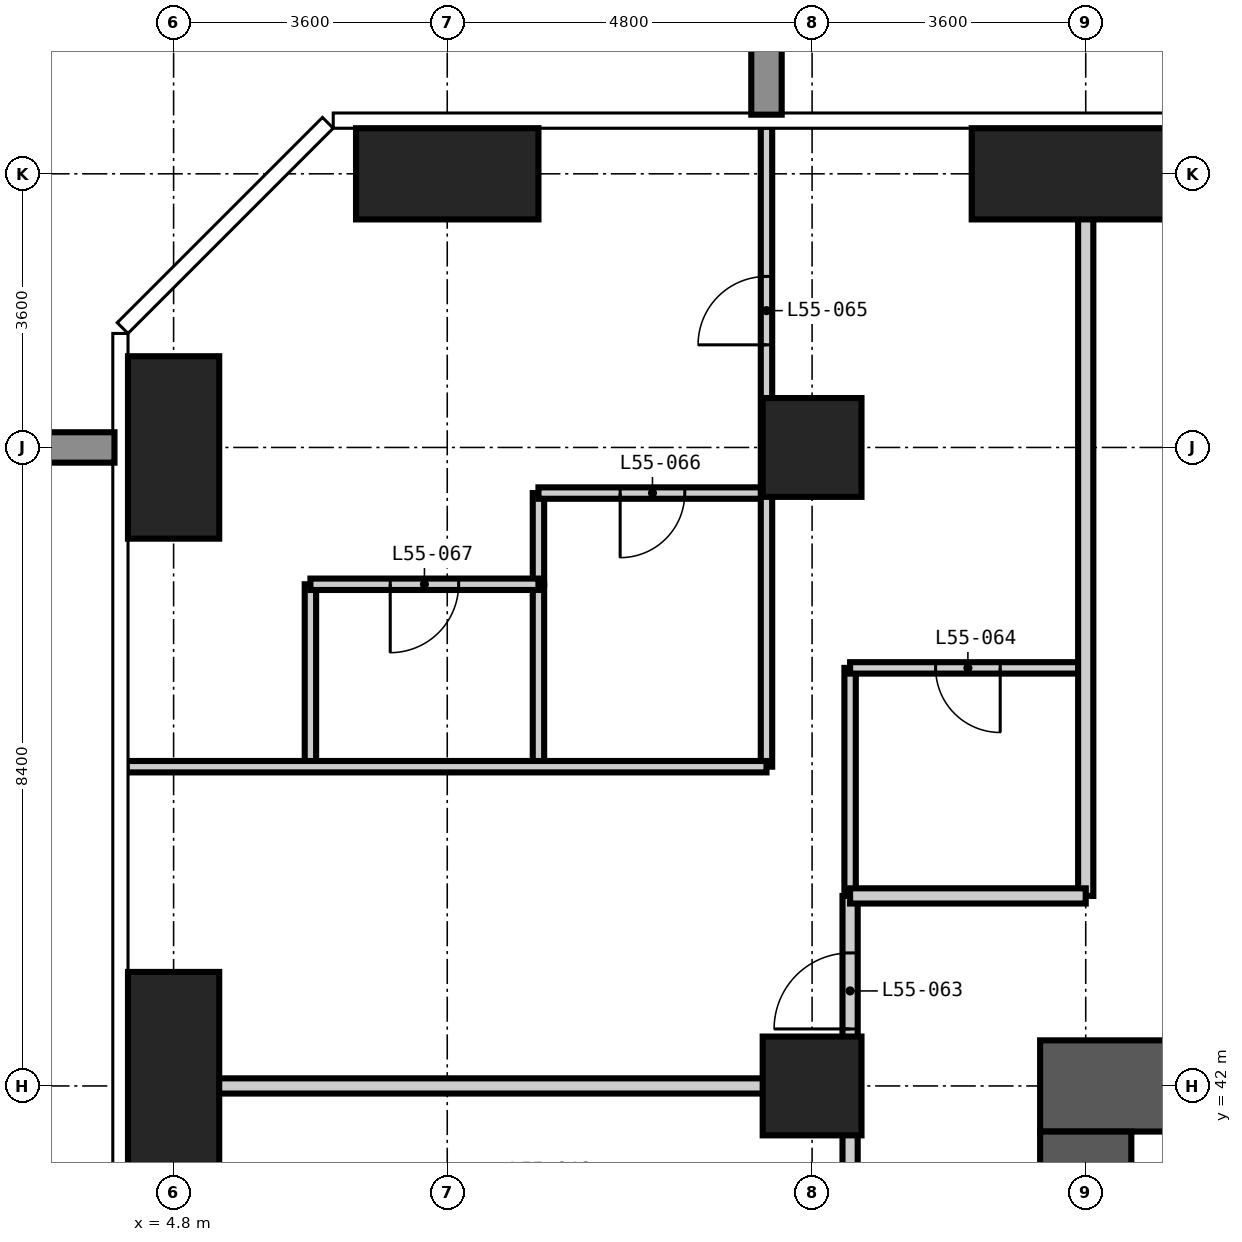
"""IFC4 building model, lengths in metres.
Left out: names, types, materials, properties, quantities, classifications, styles, units other than length and angle.
Written with IfcOpenShell. Run it as: python <this file> out.ifc"""

import sys

from ifc_helpers import new_model, si_unit, direction, frame, frame_2d, origin, origin_2d, place, context, subcontext, project, spatial, rectangle, extrude, element, fill, save


model = new_model("IFC4")
c1 = context("Model", 3, precision=1e-05, world=origin(), true_north=direction((0.0, 1.0)))
c2 = subcontext(c1, "Body", "Model", "MODEL_VIEW")
j1 = project(units=[si_unit("LENGTHUNIT", "METRE"), si_unit("PLANEANGLEUNIT", "RADIAN")], contexts=[c1])
p1 = place(None, origin())
s1 = spatial("IfcSite", under=j1, at=p1, CompositionType="ELEMENT")
p2 = place(p1, origin())
s2 = spatial("IfcBuilding", under=s1, at=p2, CompositionType="ELEMENT")
p3 = place(p2, frame((0.0, 0.0, 213.0)))
s3 = spatial("IfcBuildingStorey", under=s2, at=p3, CompositionType="ELEMENT", Elevation=213.0)
p4 = place(p3, frame((4.8, 42.0, -0.35), z_axis=(0.0, 0.0, 1.0), x_axis=(1.0, 0.0, 0.0)))
e1 = element("IfcColumn", 1, at=p4, inside=s3, PredefinedType="COLUMN", context=c2, shape_type="SweptSolid", body=[
    extrude(rectangle(XDim=1.2, YDim=3.0, at=origin_2d()), origin(), (0.0, 0.0, 1.0), 3.6),
])
p5 = place(p3, frame((4.8, 50.4, -0.35), z_axis=(0.0, 0.0, 1.0), x_axis=(1.0, 0.0, 0.0)))
e2 = element("IfcColumn", 2, at=p5, inside=s3, PredefinedType="COLUMN", context=c2, shape_type="SweptSolid", body=[
    extrude(rectangle(XDim=1.2, YDim=2.4, at=origin_2d()), origin(), (0.0, 0.0, 1.0), 3.6),
])
p6 = place(p3, frame((8.4, 54.0, -0.35), z_axis=(0.0, 0.0, 1.0), x_axis=(1.0, 0.0, 0.0)))
e3 = element("IfcColumn", 3, at=p6, inside=s3, PredefinedType="COLUMN", context=c2, shape_type="SweptSolid", body=[
    extrude(rectangle(XDim=2.4, YDim=1.2, at=origin_2d()), origin(), (0.0, 0.0, 1.0), 3.6),
])
for number, where, z_axis, x_axis in (
    (4, (13.2, 42.0, -0.35), (0.0, 0.0, 1.0), (1.0, 0.0, 0.0)),
    (5, (13.2, 50.4, -0.35), (0.0, 0.0, 1.0), (1.0, 0.0, 0.0)),
):
    element("IfcColumn", number, at=place(p3, frame(where, z_axis=z_axis, x_axis=x_axis)), inside=s3, PredefinedType="COLUMN", context=c2, shape_type="SweptSolid", body=[
        extrude(rectangle(XDim=1.3, YDim=1.3, at=origin_2d()), origin(), (0.0, 0.0, 1.0), 3.6),
    ])
p7 = place(p3, frame((16.8, 54.0, -0.35), z_axis=(0.0, 0.0, 1.0), x_axis=(1.0, 0.0, 0.0)))
e6 = element("IfcColumn", 6, at=p7, inside=s3, PredefinedType="COLUMN", context=c2, shape_type="SweptSolid", body=[
    extrude(rectangle(XDim=3.0, YDim=1.2, at=origin_2d()), origin(), (0.0, 0.0, 1.0), 3.6),
])
p8 = place(p3, frame((42.6, 42.0, -0.35), z_axis=(0.0, 0.0, 1.0), x_axis=(-1.0, 0.0, 0.0)))
e7 = element("IfcWall", 7, at=p8, inside=s3, PredefinedType="SHEAR", context=c2, shape_type="SweptSolid", body=[
    extrude(rectangle(XDim=26.4, YDim=1.2, at=frame_2d((13.2, 0.0))), origin(), (0.0, 0.0, 1.0), 3.6),
])
p9 = place(p8, frame((21.1, 0.0, 0.35)))
e8 = element("IfcOpeningElement", 8, at=p9, cuts=e7, PredefinedType="OPENING", context=c2, shape_type="SweptSolid", body=[
    extrude(rectangle(XDim=1.0, YDim=2.1, at=frame_2d((0.5, 1.05))), frame((0.0, 0.61, 0.0), z_axis=(0.0, -1.0, 0.0), x_axis=(1.0, 0.0, 0.0)), (0.0, 0.0, 1.0), 1.22),
])
p10 = place(p8, frame((10.5, 0.0, 0.35)))
e9 = element("IfcOpeningElement", 9, at=p10, cuts=e7, PredefinedType="OPENING", context=c2, shape_type="SweptSolid", body=[
    extrude(rectangle(XDim=1.2, YDim=2.2, at=frame_2d((0.6, 1.1))), frame((0.0, 0.61, 0.0), z_axis=(0.0, -1.0, 0.0), x_axis=(1.0, 0.0, 0.0)), (0.0, 0.0, 1.0), 1.22),
])
p11 = place(p3, frame((16.8, 41.4, -0.35), z_axis=(0.0, 0.0, 1.0), x_axis=(0.0, -1.0, 0.0)))
e10 = element("IfcWall", 10, at=p11, inside=s3, PredefinedType="SHEAR", context=c2, shape_type="SweptSolid", body=[
    extrude(rectangle(XDim=24.0, YDim=1.2, at=frame_2d((12.0, 0.0))), origin(), (0.0, 0.0, 1.0), 3.6),
])
p12 = place(p11, frame((11.1, 0.0, 0.35)))
e11 = element("IfcOpeningElement", 11, at=p12, cuts=e10, PredefinedType="OPENING", context=c2, shape_type="SweptSolid", body=[
    extrude(rectangle(XDim=1.8, YDim=2.2, at=frame_2d((0.9, 1.1))), frame((0.0, 0.61, 0.0), z_axis=(0.0, -1.0, 0.0), x_axis=(1.0, 0.0, 0.0)), (0.0, 0.0, 1.0), 1.22),
])
p13 = place(p11, frame((19.9, 0.0, 0.35)))
e12 = element("IfcOpeningElement", 12, at=p13, cuts=e10, PredefinedType="OPENING", context=c2, shape_type="SweptSolid", body=[
    extrude(rectangle(XDim=1.0, YDim=2.1, at=frame_2d((0.5, 1.05))), frame((0.0, 0.61, 0.0), z_axis=(0.0, -1.0, 0.0), x_axis=(1.0, 0.0, 0.0)), (0.0, 0.0, 1.0), 1.22),
])
p14 = place(p11, frame((5.2, 0.0, 0.35)))
e13 = element("IfcOpeningElement", 13, at=p14, cuts=e10, PredefinedType="OPENING", context=c2, shape_type="SweptSolid", body=[
    extrude(rectangle(XDim=1.0, YDim=2.1, at=frame_2d((0.5, 1.05))), frame((0.0, 0.61, 0.0), z_axis=(0.0, -1.0, 0.0), x_axis=(1.0, 0.0, 0.0)), (0.0, 0.0, 1.0), 1.22),
])
p15 = place(p3, frame((9.6, 48.6, 0.0), z_axis=(0.0, 0.0, 1.0), x_axis=(0.0, 1.0, 0.0)))
e14 = element("IfcWall", 14, at=p15, inside=s3, PredefinedType="PARTITIONING", context=c2, shape_type="SweptSolid", body=[
    extrude(rectangle(XDim=1.2, YDim=0.15, at=frame_2d((0.6, 0.0))), origin(), (0.0, 0.0, 1.0), 3.25),
])
p16 = place(p3, frame((13.7, 44.5, 0.0), z_axis=(0.0, 0.0, 1.0), x_axis=(0.0, 1.0, 0.0)))
e15 = element("IfcWall", 15, at=p16, inside=s3, PredefinedType="PARTITIONING", context=c2, shape_type="SweptSolid", body=[
    extrude(rectangle(XDim=3.0, YDim=0.15, at=frame_2d((1.5, 0.0))), origin(), (0.0, 0.0, 1.0), 3.25),
])
p17 = place(p3, frame((13.7, 47.5, 0.0), z_axis=(0.0, 0.0, 1.0), x_axis=(1.0, 0.0, 0.0)))
e16 = element("IfcWall", 16, at=p17, inside=s3, PredefinedType="PARTITIONING", context=c2, shape_type="SweptSolid", body=[
    extrude(rectangle(XDim=3.1, YDim=0.15, at=frame_2d((1.55, 0.0))), origin(), (0.0, 0.0, 1.0), 3.25),
])
p18 = place(p17, frame((1.125, 0.0, 0.0)))
e17 = element("IfcOpeningElement", 17, at=p18, cuts=e16, PredefinedType="OPENING", context=c2, shape_type="SweptSolid", body=[
    extrude(rectangle(XDim=0.85, YDim=2.1, at=frame_2d((0.425, 1.05))), frame((0.0, 0.085, 0.0), z_axis=(0.0, -1.0, 0.0), x_axis=(1.0, 0.0, 0.0)), (0.0, 0.0, 1.0), 0.17),
])
p19 = place(p3, frame((9.6, 49.8, 0.0), z_axis=(0.0, 0.0, 1.0), x_axis=(1.0, 0.0, 0.0)))
e18 = element("IfcWall", 18, at=p19, inside=s3, PredefinedType="PARTITIONING", context=c2, shape_type="SweptSolid", body=[
    extrude(rectangle(XDim=3.0, YDim=0.15, at=frame_2d((1.5, 0.0))), origin(), (0.0, 0.0, 1.0), 3.25),
])
p20 = place(p19, frame((1.075, 0.0, 0.0)))
e19 = element("IfcOpeningElement", 19, at=p20, cuts=e18, PredefinedType="OPENING", context=c2, shape_type="SweptSolid", body=[
    extrude(rectangle(XDim=0.85, YDim=2.1, at=frame_2d((0.425, 1.05))), frame((0.0, 0.085, 0.0), z_axis=(0.0, -1.0, 0.0), x_axis=(1.0, 0.0, 0.0)), (0.0, 0.0, 1.0), 0.17),
])
p21 = place(p3, frame((13.7, 13.7, 0.0), z_axis=(0.0, 0.0, 1.0), x_axis=(0.0, 1.0, 0.0)))
e20 = element("IfcWall", 20, at=p21, inside=s3, PredefinedType="PARTITIONING", context=c2, shape_type="SweptSolid", body=[
    extrude(rectangle(XDim=30.8, YDim=0.2, at=frame_2d((15.4, 0.0))), origin(), (0.0, 0.0, 1.0), 3.25),
])
p22 = place(p21, frame((4.7, 0.0, 0.0)))
e21 = element("IfcOpeningElement", 21, at=p22, cuts=e20, PredefinedType="OPENING", context=c2, shape_type="SweptSolid", body=[
    extrude(rectangle(XDim=1.0, YDim=2.2, at=frame_2d((0.5, 1.1))), frame((0.0, 0.11, 0.0), z_axis=(0.0, -1.0, 0.0), x_axis=(1.0, 0.0, 0.0)), (0.0, 0.0, 1.0), 0.22),
])
p23 = place(p21, frame((12.2, 0.0, 0.0)))
e22 = element("IfcOpeningElement", 22, at=p23, cuts=e20, PredefinedType="OPENING", context=c2, shape_type="SweptSolid", body=[
    extrude(rectangle(XDim=1.0, YDim=2.2, at=frame_2d((0.5, 1.1))), frame((0.0, 0.11, 0.0), z_axis=(0.0, -1.0, 0.0), x_axis=(1.0, 0.0, 0.0)), (0.0, 0.0, 1.0), 0.22),
])
p24 = place(p21, frame((18.2, 0.0, 0.0)))
e23 = element("IfcOpeningElement", 23, at=p24, cuts=e20, PredefinedType="OPENING", context=c2, shape_type="SweptSolid", body=[
    extrude(rectangle(XDim=1.0, YDim=2.2, at=frame_2d((0.5, 1.1))), frame((0.0, 0.11, 0.0), z_axis=(0.0, -1.0, 0.0), x_axis=(1.0, 0.0, 0.0)), (0.0, 0.0, 1.0), 0.22),
])
p25 = place(p21, frame((25.7, 0.0, 0.0)))
e24 = element("IfcOpeningElement", 24, at=p25, cuts=e20, PredefinedType="OPENING", context=c2, shape_type="SweptSolid", body=[
    extrude(rectangle(XDim=1.0, YDim=2.2, at=frame_2d((0.5, 1.1))), frame((0.0, 0.11, 0.0), z_axis=(0.0, -1.0, 0.0), x_axis=(1.0, 0.0, 0.0)), (0.0, 0.0, 1.0), 0.22),
])
p26 = place(p21, frame((1.05, 0.0, 0.0)))
e25 = element("IfcOpeningElement", 25, at=p26, cuts=e20, PredefinedType="OPENING", context=c2, shape_type="SweptSolid", body=[
    extrude(rectangle(XDim=1.0, YDim=2.2, at=frame_2d((0.5, 1.1))), frame((0.0, 0.11, 0.0), z_axis=(0.0, -1.0, 0.0), x_axis=(1.0, 0.0, 0.0)), (0.0, 0.0, 1.0), 0.22),
])
p27 = place(p21, frame((29.05, 0.0, 0.0)))
e26 = element("IfcOpeningElement", 26, at=p27, cuts=e20, PredefinedType="OPENING", context=c2, shape_type="SweptSolid", body=[
    extrude(rectangle(XDim=1.0, YDim=2.2, at=frame_2d((0.5, 1.1))), frame((0.0, 0.11, 0.0), z_axis=(0.0, -1.0, 0.0), x_axis=(1.0, 0.0, 0.0)), (0.0, 0.0, 1.0), 0.22),
])
p28 = place(p3, frame((16.8, 44.5, 0.0), z_axis=(0.0, 0.0, 1.0), x_axis=(0.0, 1.0, 0.0)))
e27 = element("IfcWall", 27, at=p28, inside=s3, PredefinedType="PARTITIONING", context=c2, shape_type="SweptSolid", body=[
    extrude(rectangle(XDim=10.118, YDim=0.2, at=frame_2d((5.059, 0.0))), origin(), (0.0, 0.0, 1.0), 3.25),
])
p29 = place(p3, frame((13.7, 44.5, 0.0), z_axis=(0.0, 0.0, 1.0), x_axis=(1.0, 0.0, 0.0)))
e28 = element("IfcWall", 28, at=p29, inside=s3, PredefinedType="PARTITIONING", context=c2, shape_type="SweptSolid", body=[
    extrude(rectangle(XDim=3.1, YDim=0.2, at=frame_2d((1.55, 0.0))), origin(), (0.0, 0.0, 1.0), 3.25),
])
p30 = place(p3, frame((4.182, 42.0, 0.0), z_axis=(0.0, 0.0, 1.0), x_axis=(1.0, 0.0, 0.0)))
e29 = element("IfcWall", 29, at=p30, inside=s3, PredefinedType="PARTITIONING", context=c2, shape_type="SweptSolid", body=[
    extrude(rectangle(XDim=9.518, YDim=0.2, at=frame_2d((4.759, 0.0))), origin(), (0.0, 0.0, 1.0), 3.25),
])
for number, where, z_axis, x_axis in (
    (30, (6.6, 46.2, 0.0), (0.0, 0.0, 1.0), (0.0, 1.0, 0.0)),
    (31, (9.6, 46.2, 0.0), (0.0, 0.0, 1.0), (0.0, 1.0, 0.0)),
):
    element("IfcWall", number, at=place(p3, frame(where, z_axis=z_axis, x_axis=x_axis)), inside=s3, PredefinedType="PARTITIONING", context=c2, shape_type="SweptSolid", body=[
        extrude(rectangle(XDim=2.4, YDim=0.15, at=frame_2d((1.2, 0.0))), origin(), (0.0, 0.0, 1.0), 3.25),
    ])
p31 = place(p3, frame((12.6, 46.2, 0.0), z_axis=(0.0, 0.0, 1.0), x_axis=(0.0, 1.0, 0.0)))
e32 = element("IfcWall", 32, at=p31, inside=s3, PredefinedType="PARTITIONING", context=c2, shape_type="SweptSolid", body=[
    extrude(rectangle(XDim=8.418, YDim=0.15, at=frame_2d((4.209, 0.0))), origin(), (0.0, 0.0, 1.0), 3.25),
])
p32 = place(p31, frame((5.55, 0.0, 0.0)))
e33 = element("IfcOpeningElement", 33, at=p32, cuts=e32, PredefinedType="OPENING", context=c2, shape_type="SweptSolid", body=[
    extrude(rectangle(XDim=0.9, YDim=2.1, at=frame_2d((0.45, 1.05))), frame((0.0, 0.085, 0.0), z_axis=(0.0, -1.0, 0.0), x_axis=(1.0, 0.0, 0.0)), (0.0, 0.0, 1.0), 0.17),
])
p33 = place(p3, frame((4.182, 46.2, 0.0), z_axis=(0.0, 0.0, 1.0), x_axis=(1.0, 0.0, 0.0)))
e34 = element("IfcWall", 34, at=p33, inside=s3, PredefinedType="PARTITIONING", context=c2, shape_type="SweptSolid", body=[
    extrude(rectangle(XDim=8.418, YDim=0.15, at=frame_2d((4.209, 0.0))), origin(), (0.0, 0.0, 1.0), 3.25),
])
p34 = place(p3, frame((6.6, 48.6, 0.0), z_axis=(0.0, 0.0, 1.0), x_axis=(1.0, 0.0, 0.0)))
e35 = element("IfcWall", 35, at=p34, inside=s3, PredefinedType="PARTITIONING", context=c2, shape_type="SweptSolid", body=[
    extrude(rectangle(XDim=3.0, YDim=0.15, at=frame_2d((1.5, 0.0))), origin(), (0.0, 0.0, 1.0), 3.25),
])
p35 = place(p34, frame((1.05, 0.0, 0.0)))
e36 = element("IfcOpeningElement", 36, at=p35, cuts=e35, PredefinedType="OPENING", context=c2, shape_type="SweptSolid", body=[
    extrude(rectangle(XDim=0.9, YDim=2.1, at=frame_2d((0.45, 1.05))), frame((0.0, 0.085, 0.0), z_axis=(0.0, -1.0, 0.0), x_axis=(1.0, 0.0, 0.0)), (0.0, 0.0, 1.0), 0.17),
])
p36 = place(p27, origin())
e37 = element("IfcDoor", 37, at=p36, inside=s3, OperationType="SINGLE_SWING_LEFT", PredefinedType="DOOR", context=c2, shape_type="SweptSolid", body=[
    extrude(rectangle(XDim=1.0, YDim=2.2, at=frame_2d((0.5, 1.1))), frame((0.0, 0.025, 0.0), z_axis=(0.0, -1.0, 0.0), x_axis=(1.0, 0.0, 0.0)), (0.0, 0.0, 1.0), 0.05),
])
fill(e26, e37)
p37 = place(p18, frame((0.85, 0.0, 0.0), z_axis=(0.0, 0.0, 1.0), x_axis=(-1.0, 0.0, 0.0)))
e38 = element("IfcDoor", 38, at=p37, inside=s3, OperationType="SINGLE_SWING_LEFT", PredefinedType="DOOR", context=c2, shape_type="SweptSolid", body=[
    extrude(rectangle(XDim=0.85, YDim=2.1, at=frame_2d((0.425, 1.05))), frame((0.0, 0.025, 0.0), z_axis=(0.0, -1.0, 0.0), x_axis=(1.0, 0.0, 0.0)), (0.0, 0.0, 1.0), 0.05),
])
fill(e17, e38)
p38 = place(p32, origin())
e39 = element("IfcDoor", 39, at=p38, inside=s3, OperationType="SINGLE_SWING_LEFT", PredefinedType="DOOR", context=c2, shape_type="SweptSolid", body=[
    extrude(rectangle(XDim=0.9, YDim=2.1, at=frame_2d((0.45, 1.05))), frame((0.0, 0.025, 0.0), z_axis=(0.0, -1.0, 0.0), x_axis=(1.0, 0.0, 0.0)), (0.0, 0.0, 1.0), 0.05),
])
fill(e33, e39)
p39 = place(p20, frame((0.85, 0.0, 0.0), z_axis=(0.0, 0.0, 1.0), x_axis=(-1.0, 0.0, 0.0)))
e40 = element("IfcDoor", 40, at=p39, inside=s3, OperationType="SINGLE_SWING_RIGHT", PredefinedType="DOOR", context=c2, shape_type="SweptSolid", body=[
    extrude(rectangle(XDim=0.85, YDim=2.1, at=frame_2d((0.425, 1.05))), frame((0.0, 0.025, 0.0), z_axis=(0.0, -1.0, 0.0), x_axis=(1.0, 0.0, 0.0)), (0.0, 0.0, 1.0), 0.05),
])
fill(e19, e40)
p40 = place(p35, frame((0.9, 0.0, 0.0), z_axis=(0.0, 0.0, 1.0), x_axis=(-1.0, 0.0, 0.0)))
e41 = element("IfcDoor", 41, at=p40, inside=s3, OperationType="SINGLE_SWING_RIGHT", PredefinedType="DOOR", context=c2, shape_type="SweptSolid", body=[
    extrude(rectangle(XDim=0.9, YDim=2.1, at=frame_2d((0.45, 1.05))), frame((0.0, 0.025, 0.0), z_axis=(0.0, -1.0, 0.0), x_axis=(1.0, 0.0, 0.0)), (0.0, 0.0, 1.0), 0.05),
])
fill(e36, e41)
save(model, sys.argv[1])
